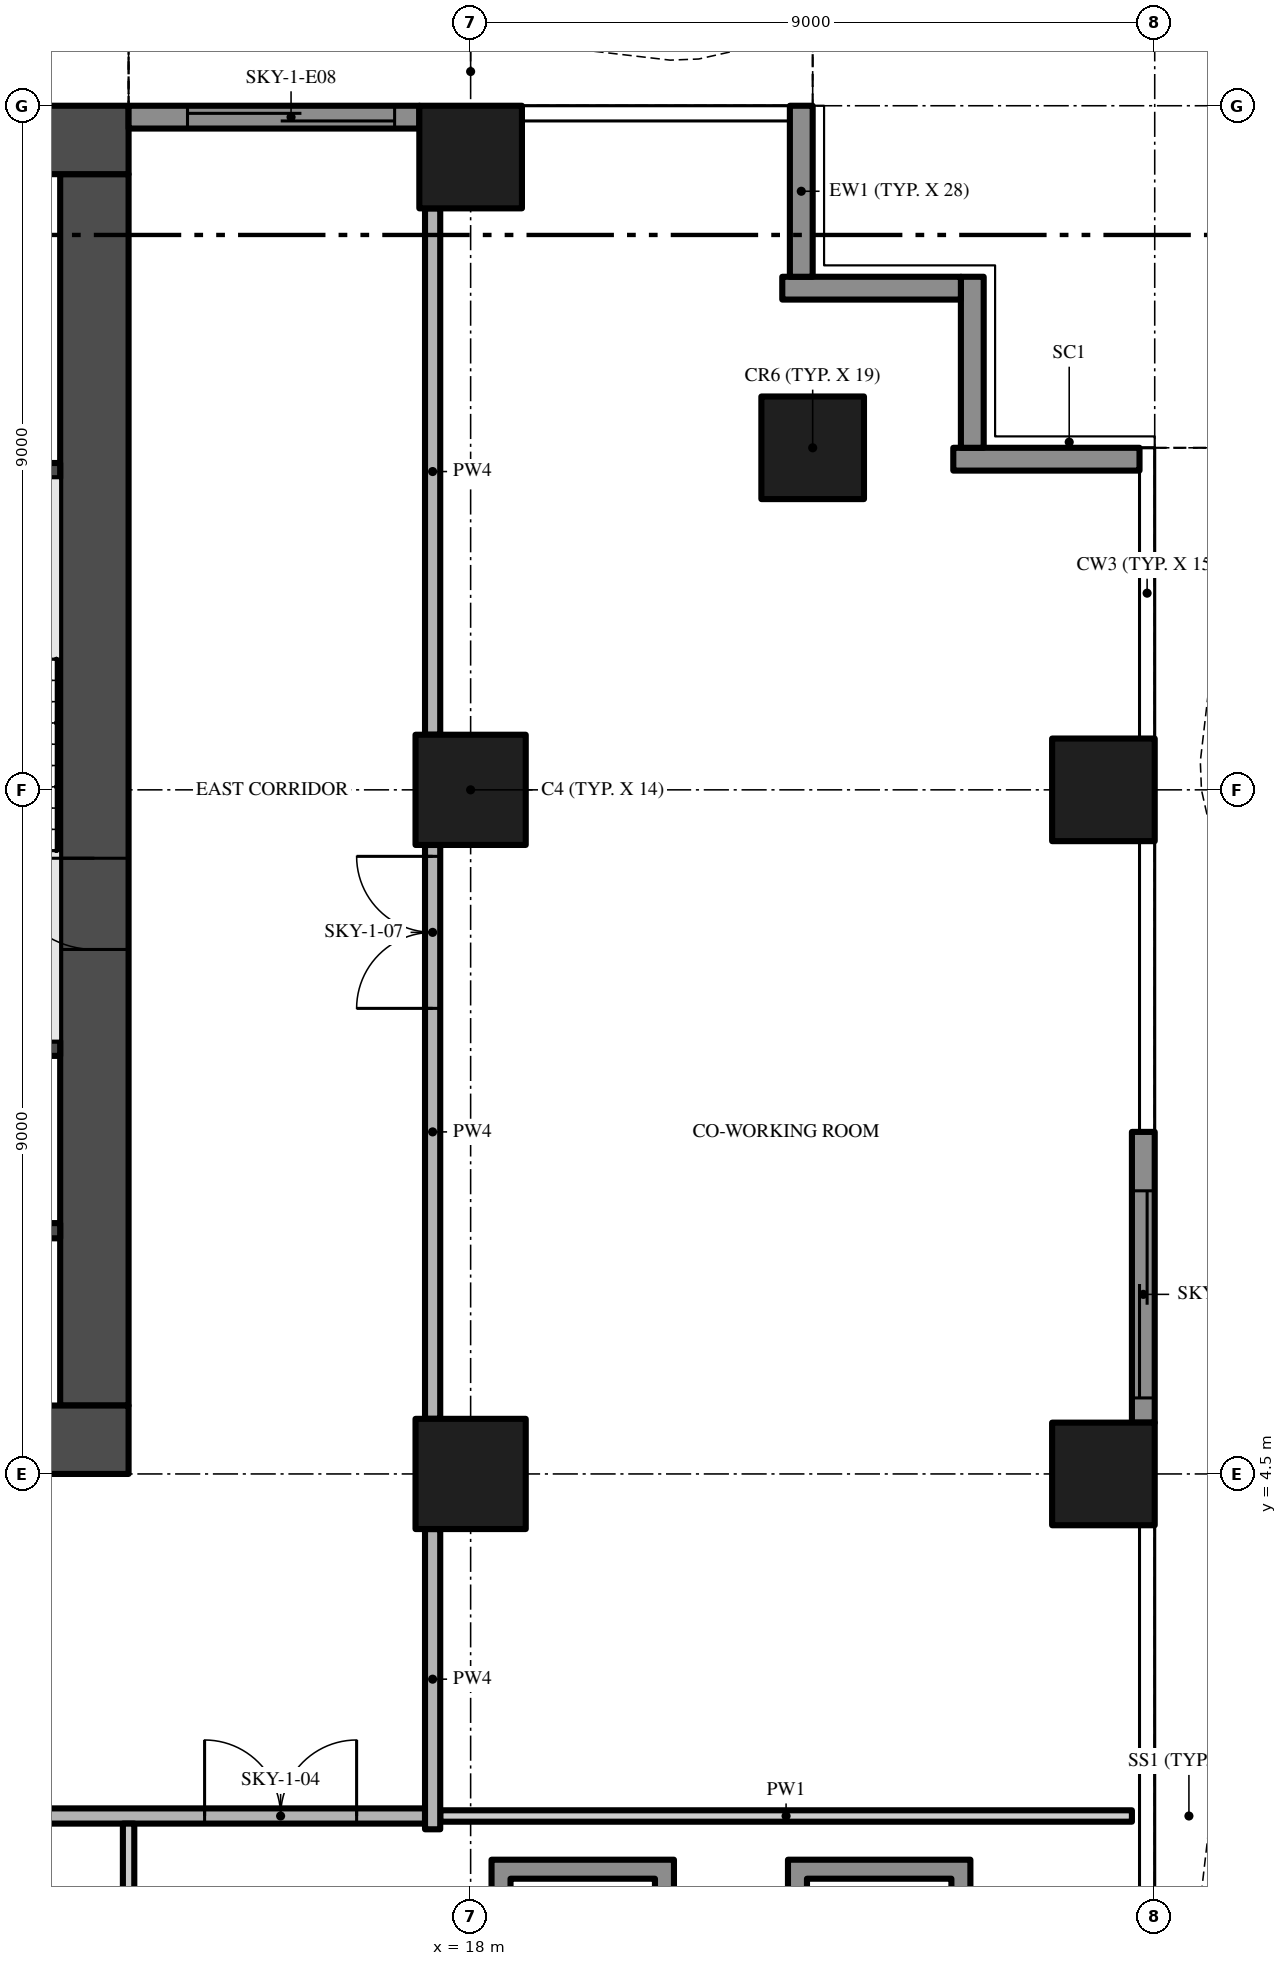
"""IFC4 building model, lengths in metres.
Left out: names, types, materials, properties, quantities, classifications, styles, units other than length and angle.
Written with IfcOpenShell. Run it as: python <this file> out.ifc"""

import sys

from ifc_helpers import new_model, si_unit, direction, frame, frame_2d, origin, origin_2d, place, context, subcontext, project, spatial, polyline, rectangle, outline, extrude, element, fill, save


model = new_model("IFC4")
c1 = context("Model", 3, precision=1e-05, world=origin(), true_north=direction((0.0, 1.0)))
c2 = subcontext(c1, "Body", "Model", "MODEL_VIEW")
j1 = project(units=[si_unit("LENGTHUNIT", "METRE"), si_unit("PLANEANGLEUNIT", "RADIAN")], contexts=[c1])
p1 = place(None, origin())
s1 = spatial("IfcSite", under=j1, at=p1, CompositionType="ELEMENT")
p2 = place(p1, origin())
s2 = spatial("IfcBuilding", under=s1, at=p2, CompositionType="ELEMENT")
p3 = place(p2, frame((0.0, 0.0, 64.4)))
s3 = spatial("IfcBuildingStorey", under=s2, at=p3, CompositionType="ELEMENT", Elevation=64.4)
p4 = place(p3, frame((-13.5, 4.95, -0.3), z_axis=(0.0, 0.0, 1.0), x_axis=(1.0, 0.0, 0.0)))
e1 = element("IfcWall", 1, at=p4, inside=s3, PredefinedType="SHEAR", context=c2, shape_type="SweptSolid", body=[
    extrude(rectangle(XDim=27.0, YDim=0.9, at=frame_2d((13.5, 0.0))), origin(), (0.0, 0.0, 1.0), 5.0),
])
p5 = place(p4, frame((12.0, 0.0, 0.3)))
e2 = element("IfcOpeningElement", 2, at=p5, cuts=e1, PredefinedType="OPENING", context=c2, shape_type="SweptSolid", body=[
    extrude(rectangle(XDim=3.0, YDim=2.4, at=frame_2d((1.5, 1.2))), frame((0.0, 0.46, 0.0), z_axis=(0.0, -1.0, 0.0), x_axis=(1.0, 0.0, 0.0)), (0.0, 0.0, 1.0), 0.92),
])
p6 = place(p4, frame((4.9, 0.0, 0.3)))
e3 = element("IfcOpeningElement", 3, at=p6, cuts=e1, PredefinedType="OPENING", context=c2, shape_type="SweptSolid", body=[
    extrude(rectangle(XDim=1.2, YDim=2.2, at=frame_2d((0.6, 1.1))), frame((0.0, 0.46, 0.0), z_axis=(0.0, -1.0, 0.0), x_axis=(1.0, 0.0, 0.0)), (0.0, 0.0, 1.0), 0.92),
])
p7 = place(p4, frame((20.75, 0.0, 0.3)))
e4 = element("IfcOpeningElement", 4, at=p7, cuts=e1, PredefinedType="OPENING", context=c2, shape_type="SweptSolid", body=[
    extrude(rectangle(XDim=1.5, YDim=2.2, at=frame_2d((0.75, 1.1))), frame((0.0, 0.46, 0.0), z_axis=(0.0, -1.0, 0.0), x_axis=(1.0, 0.0, 0.0)), (0.0, 0.0, 1.0), 0.92),
])
p8 = place(p4, frame((17.4, 0.0, 0.3)))
e5 = element("IfcOpeningElement", 5, at=p8, cuts=e1, PredefinedType="OPENING", context=c2, shape_type="SweptSolid", body=[
    extrude(rectangle(XDim=1.2, YDim=2.2, at=frame_2d((0.6, 1.1))), frame((0.0, 0.46, 0.0), z_axis=(0.0, -1.0, 0.0), x_axis=(1.0, 0.0, 0.0)), (0.0, 0.0, 1.0), 0.92),
])
p9 = place(p3, frame((13.05, 5.4, -0.3), z_axis=(0.0, 0.0, 1.0), x_axis=(0.0, 1.0, 0.0)))
e6 = element("IfcWall", 6, at=p9, inside=s3, PredefinedType="SHEAR", context=c2, shape_type="SweptSolid", body=[
    extrude(rectangle(XDim=16.2, YDim=0.9, at=frame_2d((8.1, 0.0))), origin(), (0.0, 0.0, 1.0), 5.0),
])
p10 = place(p9, frame((6.0, 0.0, 0.3)))
e7 = element("IfcOpeningElement", 7, at=p10, cuts=e6, PredefinedType="OPENING", context=c2, shape_type="SweptSolid", body=[
    extrude(rectangle(XDim=1.2, YDim=2.2, at=frame_2d((0.6, 1.1))), frame((0.0, 0.46, 0.0), z_axis=(0.0, -1.0, 0.0), x_axis=(1.0, 0.0, 0.0)), (0.0, 0.0, 1.0), 0.92),
])
p11 = place(p3, frame((13.5, 22.05, -0.3), z_axis=(0.0, 0.0, 1.0), x_axis=(-1.0, 0.0, 0.0)))
e8 = element("IfcWall", 8, at=p11, inside=s3, PredefinedType="SHEAR", context=c2, shape_type="SweptSolid", body=[
    extrude(rectangle(XDim=27.0, YDim=0.9, at=frame_2d((13.5, 0.0))), origin(), (0.0, 0.0, 1.0), 5.0),
])
p12 = place(p3, frame((18.0, 13.5, 0.0), z_axis=(0.0, 0.0, 1.0), x_axis=(1.0, 0.0, 0.0)))
e9 = element("IfcColumn", 9, at=p12, inside=s3, PredefinedType="COLUMN", context=c2, shape_type="SweptSolid", body=[
    extrude(rectangle(XDim=1.45, YDim=1.45, at=origin_2d()), origin(), (0.0, 0.0, 1.0), 4.7),
])
p13 = place(p3, frame((18.0, 21.825, 0.0), z_axis=(0.0, 0.0, 1.0), x_axis=(1.0, 0.0, 0.0)))
e10 = element("IfcColumn", 10, at=p13, inside=s3, PredefinedType="COLUMN", context=c2, shape_type="SweptSolid", body=[
    extrude(rectangle(XDim=1.35, YDim=1.35, at=origin_2d()), origin(), (0.0, 0.0, 1.0), 4.7),
])
p14 = place(p3, frame((18.0, 4.5, 0.0), z_axis=(0.0, 0.0, 1.0), x_axis=(1.0, 0.0, 0.0)))
e11 = element("IfcColumn", 11, at=p14, inside=s3, PredefinedType="COLUMN", context=c2, shape_type="SweptSolid", body=[
    extrude(rectangle(XDim=1.45, YDim=1.45, at=origin_2d()), origin(), (0.0, 0.0, 1.0), 4.7),
])
for number, where, z_axis, x_axis in (
    (12, (26.325, 13.5, 0.0), (0.0, 0.0, 1.0), (1.0, 0.0, 0.0)),
    (13, (22.5, 18.0, 0.0), (0.0, 0.0, 1.0), (1.0, 0.0, 0.0)),
    (14, (26.325, 4.5, 0.0), (0.0, 0.0, 1.0), (1.0, 0.0, 0.0)),
):
    element("IfcColumn", number, at=place(p3, frame(where, z_axis=z_axis, x_axis=x_axis)), inside=s3, PredefinedType="COLUMN", context=c2, shape_type="SweptSolid", body=[
        extrude(rectangle(XDim=1.35, YDim=1.35, at=origin_2d()), origin(), (0.0, 0.0, 1.0), 4.7),
    ])
p15 = place(p3, frame((26.85, 9.0, 0.0), z_axis=(0.0, 0.0, 1.0), x_axis=(0.0, -1.0, 0.0)))
e15 = element("IfcWall", 15, at=p15, inside=s3, PredefinedType="SOLIDWALL", context=c2, shape_type="SweptSolid", body=[
    extrude(rectangle(XDim=3.825, YDim=0.3, at=frame_2d((1.913, 0.0))), origin(), (0.0, 0.0, 1.0), 4.7),
])
p16 = place(p15, frame((0.775, 0.0, 0.0)))
e16 = element("IfcOpeningElement", 16, at=p16, cuts=e15, PredefinedType="OPENING", context=c2, shape_type="SweptSolid", body=[
    extrude(rectangle(XDim=2.725, YDim=2.4, at=frame_2d((1.363, 1.2))), frame((0.0, 0.16, 0.0), z_axis=(0.0, -1.0, 0.0), x_axis=(1.0, 0.0, 0.0)), (0.0, 0.0, 1.0), 0.32),
])
p17 = place(p3, frame((24.35, 17.85, 0.0), z_axis=(0.0, 0.0, 1.0), x_axis=(1.0, 0.0, 0.0)))
e17 = element("IfcWall", 17, at=p17, inside=s3, PredefinedType="SOLIDWALL", context=c2, shape_type="SweptSolid", body=[
    extrude(rectangle(XDim=2.45, YDim=0.3, at=frame_2d((1.225, 0.0))), origin(), (0.0, 0.0, 1.0), 4.7),
])
p18 = place(p3, frame((24.6, 20.25, 0.0), z_axis=(0.0, 0.0, 1.0), x_axis=(0.0, -1.0, 0.0)))
e18 = element("IfcWall", 18, at=p18, inside=s3, PredefinedType="SOLIDWALL", context=c2, shape_type="SweptSolid", body=[
    extrude(rectangle(XDim=2.25, YDim=0.3, at=frame_2d((1.125, 0.0))), origin(), (0.0, 0.0, 1.0), 4.7),
])
p19 = place(p3, frame((22.1, 20.1, 0.0), z_axis=(0.0, 0.0, 1.0), x_axis=(1.0, 0.0, 0.0)))
e19 = element("IfcWall", 19, at=p19, inside=s3, PredefinedType="SOLIDWALL", context=c2, shape_type="SweptSolid", body=[
    extrude(rectangle(XDim=2.35, YDim=0.3, at=frame_2d((1.175, 0.0))), origin(), (0.0, 0.0, 1.0), 4.7),
])
p20 = place(p3, frame((22.35, 22.5, 0.0), z_axis=(0.0, 0.0, 1.0), x_axis=(0.0, -1.0, 0.0)))
e20 = element("IfcWall", 20, at=p20, inside=s3, PredefinedType="SOLIDWALL", context=c2, shape_type="SweptSolid", body=[
    extrude(rectangle(XDim=2.25, YDim=0.3, at=frame_2d((1.125, 0.0))), origin(), (0.0, 0.0, 1.0), 4.7),
])
p21 = place(p3, frame((13.5, 22.35, 0.0), z_axis=(0.0, 0.0, 1.0), x_axis=(1.0, 0.0, 0.0)))
e21 = element("IfcWall", 21, at=p21, inside=s3, PredefinedType="SOLIDWALL", context=c2, shape_type="SweptSolid", body=[
    extrude(rectangle(XDim=3.825, YDim=0.3, at=frame_2d((1.913, 0.0))), origin(), (0.0, 0.0, 1.0), 4.7),
])
p22 = place(p21, frame((0.775, 0.0, 0.0)))
e22 = element("IfcOpeningElement", 22, at=p22, cuts=e21, PredefinedType="OPENING", context=c2, shape_type="SweptSolid", body=[
    extrude(rectangle(XDim=2.725, YDim=2.4, at=frame_2d((1.363, 1.2))), frame((0.0, 0.16, 0.0), z_axis=(0.0, -1.0, 0.0), x_axis=(1.0, 0.0, 0.0)), (0.0, 0.0, 1.0), 0.32),
])
p23 = place(p3, origin())
e23 = element("IfcWall", 23, at=p23, inside=s3, PredefinedType="USERDEFINED", context=c2, shape_type="SweptSolid", body=[
    extrude(outline(polyline([(27.951, -18.0), (27.615, -16.5), (27.6, -16.125), (27.731, -15.0), (28.255, -13.5), (28.988, -12.0), (29.649, -10.5), (29.985, -9.0), (30.0, -8.625), (29.869, -7.5), (29.345, -6.0), (28.612, -4.5), (27.951, -3.0), (27.615, -1.5), (27.6, -1.125), (27.731, 0.0), (28.255, 1.5), (28.988, 3.0), (29.649, 4.5), (29.985, 6.0), (30.0, 6.375), (29.869, 7.5), (29.345, 9.0), (28.612, 10.5), (27.951, 12.0), (27.615, 13.5), (27.6, 13.875), (27.731, 15.0), (28.255, 16.5), (28.988, 18.0), (28.763, 18.11), (28.024, 16.596), (27.486, 15.056), (27.349, 13.885), (27.366, 13.467), (27.713, 11.921), (28.385, 10.395), (29.114, 8.904), (29.624, 7.444), (29.749, 6.365), (29.736, 6.033), (29.41, 4.579), (28.761, 3.105), (28.024, 1.596), (27.486, 0.056), (27.349, -1.115), (27.366, -1.533), (27.713, -3.079), (28.385, -4.605), (29.114, -6.096), (29.624, -7.556), (29.749, -8.635), (29.736, -8.967), (29.41, -10.421), (28.761, -11.895), (28.024, -13.404), (27.486, -14.944), (27.349, -16.115), (27.366, -16.533), (27.708, -18.055), (27.951, -18.0)])), origin(), (0.0, 0.0, 1.0), 0.9),
])
p24 = place(p3, origin())
e24 = element("IfcWall", 24, at=p24, inside=s3, PredefinedType="USERDEFINED", context=c2, shape_type="SweptSolid", body=[
    extrude(outline(polyline([(22.5, 23.451), (21.0, 23.115), (20.625, 23.1), (19.5, 23.231), (18.0, 23.755), (16.5, 24.488), (15.0, 25.149), (13.5, 25.485), (13.445, 25.241), (14.921, 24.91), (16.395, 24.261), (17.904, 23.524), (19.444, 22.986), (20.615, 22.849), (21.033, 22.866), (22.555, 23.208), (22.5, 23.451)])), origin(), (0.0, 0.0, 1.0), 0.9),
])
for number, where, z_axis, x_axis in (
    (25, (9.65, 7.7, 0.0), (0.0, 0.0, 1.0), (1.0, 0.0, 0.0)),
    (26, (9.65, 10.1, 0.0), (0.0, 0.0, 1.0), (1.0, 0.0, 0.0)),
    (27, (9.65, 17.7, 0.0), (0.0, 0.0, 1.0), (1.0, 0.0, 0.0)),
):
    element("IfcWall", number, at=place(p3, frame(where, z_axis=z_axis, x_axis=x_axis)), inside=s3, PredefinedType="SHEAR", context=c2, shape_type="SweptSolid", body=[
        extrude(rectangle(XDim=2.95, YDim=0.2, at=frame_2d((1.475, 0.0))), origin(), (0.0, 0.0, 1.0), 4.7),
    ])
p25 = place(p3, frame((-11.15, 0.0, 0.0), z_axis=(0.0, 0.0, 1.0), x_axis=(1.0, 0.0, 0.0)))
e28 = element("IfcWall", 28, at=p25, inside=s3, PredefinedType="PARTITIONING", context=c2, shape_type="SweptSolid", body=[
    extrude(rectangle(XDim=28.55, YDim=0.2, at=frame_2d((14.275, 0.0))), origin(), (0.0, 0.0, 1.0), 4.7),
])
p26 = place(p25, frame((11.25, 0.0, 0.0)))
e29 = element("IfcOpeningElement", 29, at=p26, cuts=e28, PredefinedType="OPENING", context=c2, shape_type="SweptSolid", body=[
    extrude(rectangle(XDim=2.0, YDim=2.4, at=frame_2d((1.0, 1.2))), frame((0.0, 0.11, 0.0), z_axis=(0.0, -1.0, 0.0), x_axis=(1.0, 0.0, 0.0)), (0.0, 0.0, 1.0), 0.22),
])
p27 = place(p25, frame((25.65, 0.0, 0.0)))
e30 = element("IfcOpeningElement", 30, at=p27, cuts=e28, PredefinedType="OPENING", context=c2, shape_type="SweptSolid", body=[
    extrude(rectangle(XDim=2.0, YDim=2.4, at=frame_2d((1.0, 1.2))), frame((0.0, 0.11, 0.0), z_axis=(0.0, -1.0, 0.0), x_axis=(1.0, 0.0, 0.0)), (0.0, 0.0, 1.0), 0.22),
])
p28 = place(p3, frame((17.6, 0.0, 0.0), z_axis=(0.0, 0.0, 1.0), x_axis=(1.0, 0.0, 0.0)))
e31 = element("IfcWall", 31, at=p28, inside=s3, PredefinedType="PARTITIONING", context=c2, shape_type="SweptSolid", body=[
    extrude(rectangle(XDim=9.1, YDim=0.15, at=frame_2d((4.55, 0.0))), origin(), (0.0, 0.0, 1.0), 4.7),
])
p29 = place(p3, frame((13.5, -22.2, 0.0), z_axis=(0.0, 0.0, 1.0), x_axis=(0.0, 1.0, 0.0)))
e32 = element("IfcWall", 32, at=p29, inside=s3, PredefinedType="PARTITIONING", context=c2, shape_type="SweptSolid", body=[
    extrude(rectangle(XDim=22.1, YDim=0.15, at=frame_2d((11.05, 0.0))), origin(), (0.0, 0.0, 1.0), 4.7),
])
p30 = place(p3, frame((17.5, -0.175, 0.0), z_axis=(0.0, 0.0, 1.0), x_axis=(0.0, 1.0, 0.0)))
e33 = element("IfcWall", 33, at=p30, inside=s3, PredefinedType="PARTITIONING", context=c2, shape_type="SweptSolid", body=[
    extrude(rectangle(XDim=3.95, YDim=0.2, at=frame_2d((1.975, 0.0))), origin(), (0.0, 0.0, 1.0), 4.7),
])
p31 = place(p3, frame((17.5, 5.225, 0.0), z_axis=(0.0, 0.0, 1.0), x_axis=(0.0, 1.0, 0.0)))
e34 = element("IfcWall", 34, at=p31, inside=s3, PredefinedType="PARTITIONING", context=c2, shape_type="SweptSolid", body=[
    extrude(rectangle(XDim=7.55, YDim=0.2, at=frame_2d((3.775, 0.0))), origin(), (0.0, 0.0, 1.0), 4.7),
])
p32 = place(p31, frame((5.4, 0.0, 0.0)))
e35 = element("IfcOpeningElement", 35, at=p32, cuts=e34, PredefinedType="OPENING", context=c2, shape_type="SweptSolid", body=[
    extrude(rectangle(XDim=2.0, YDim=2.4, at=frame_2d((1.0, 1.2))), frame((0.0, 0.11, 0.0), z_axis=(0.0, -1.0, 0.0), x_axis=(1.0, 0.0, 0.0)), (0.0, 0.0, 1.0), 0.22),
])
p33 = place(p3, frame((17.5, 14.225, 0.0), z_axis=(0.0, 0.0, 1.0), x_axis=(0.0, 1.0, 0.0)))
e36 = element("IfcWall", 36, at=p33, inside=s3, PredefinedType="PARTITIONING", context=c2, shape_type="SweptSolid", body=[
    extrude(rectangle(XDim=6.925, YDim=0.2, at=frame_2d((3.462, 0.0))), origin(), (0.0, 0.0, 1.0), 4.7),
])
p34 = place(p3, origin())
e37 = element("IfcWall", 37, at=p34, inside=s3, PredefinedType="USERDEFINED", context=c2, shape_type="SweptSolid", body=[
    extrude(outline(polyline([(20.675, -20.7), (20.675, -0.575), (18.275, -0.575), (18.275, -3.275), (19.225, -3.275), (19.225, -5.725), (18.275, -5.725), (18.275, -12.275), (19.225, -12.275), (19.225, -14.725), (18.275, -14.725), (18.275, -20.65), (19.175, -20.65), (19.175, -20.7), (20.675, -20.7)]), holes=[polyline([(19.425, -20.45), (19.425, -20.4), (18.525, -20.4), (18.525, -14.975), (19.475, -14.975), (19.475, -12.025), (18.525, -12.025), (18.525, -5.975), (19.475, -5.975), (19.475, -3.025), (18.525, -3.025), (18.525, -0.825), (20.425, -0.825), (20.425, -20.45), (19.425, -20.45)])]), origin(), (0.0, 0.0, 1.0), 0.9),
])
p35 = place(p3, origin())
e38 = element("IfcWall", 38, at=p35, inside=s3, PredefinedType="USERDEFINED", context=c2, shape_type="SweptSolid", body=[
    extrude(outline(polyline([(24.575, -16.2), (24.575, -0.575), (22.175, -0.575), (22.175, -16.825), (22.95, -16.825), (22.95, -16.2), (24.575, -16.2)]), holes=[polyline([(22.7, -15.95), (22.7, -16.575), (22.425, -16.575), (22.425, -0.825), (24.325, -0.825), (24.325, -15.95), (22.7, -15.95)])]), origin(), (0.0, 0.0, 1.0), 0.9),
])
p36 = place(p16, origin())
e39 = element("IfcDoor", 39, at=p36, inside=s3, OperationType="SINGLE_SWING_LEFT", PredefinedType="DOOR", context=c2, shape_type="SweptSolid", body=[
    extrude(rectangle(XDim=2.725, YDim=2.4, at=frame_2d((1.363, 1.2))), frame((0.0, 0.025, 0.0), z_axis=(0.0, -1.0, 0.0), x_axis=(1.0, 0.0, 0.0)), (0.0, 0.0, 1.0), 0.05),
])
fill(e16, e39)
p37 = place(p22, origin())
e40 = element("IfcDoor", 40, at=p37, inside=s3, OperationType="SINGLE_SWING_LEFT", PredefinedType="DOOR", context=c2, shape_type="SweptSolid", body=[
    extrude(rectangle(XDim=2.725, YDim=2.4, at=frame_2d((1.363, 1.2))), frame((0.0, 0.025, 0.0), z_axis=(0.0, -1.0, 0.0), x_axis=(1.0, 0.0, 0.0)), (0.0, 0.0, 1.0), 0.05),
])
fill(e22, e40)
p38 = place(p10, frame((1.2, 0.0, 0.0), z_axis=(0.0, 0.0, 1.0), x_axis=(-1.0, 0.0, 0.0)))
e41 = element("IfcDoor", 41, at=p38, inside=s3, OperationType="SINGLE_SWING_LEFT", PredefinedType="DOOR", context=c2, shape_type="SweptSolid", body=[
    extrude(rectangle(XDim=1.2, YDim=2.2, at=frame_2d((0.6, 1.1))), frame((0.0, 0.025, 0.0), z_axis=(0.0, -1.0, 0.0), x_axis=(1.0, 0.0, 0.0)), (0.0, 0.0, 1.0), 0.05),
])
fill(e7, e41)
p39 = place(p27, origin())
e42 = element("IfcDoor", 42, at=p39, inside=s3, OperationType="DOUBLE_DOOR_SINGLE_SWING", PredefinedType="DOOR", context=c2, shape_type="SweptSolid", body=[
    extrude(rectangle(XDim=2.0, YDim=2.4, at=frame_2d((1.0, 1.2))), frame((0.0, 0.025, 0.0), z_axis=(0.0, -1.0, 0.0), x_axis=(1.0, 0.0, 0.0)), (0.0, 0.0, 1.0), 0.05),
])
fill(e30, e42)
p40 = place(p32, origin())
e43 = element("IfcDoor", 43, at=p40, inside=s3, OperationType="DOUBLE_DOOR_SINGLE_SWING", PredefinedType="DOOR", context=c2, shape_type="SweptSolid", body=[
    extrude(rectangle(XDim=2.0, YDim=2.4, at=frame_2d((1.0, 1.2))), frame((0.0, 0.025, 0.0), z_axis=(0.0, -1.0, 0.0), x_axis=(1.0, 0.0, 0.0)), (0.0, 0.0, 1.0), 0.05),
])
fill(e35, e43)
save(model, sys.argv[1])
